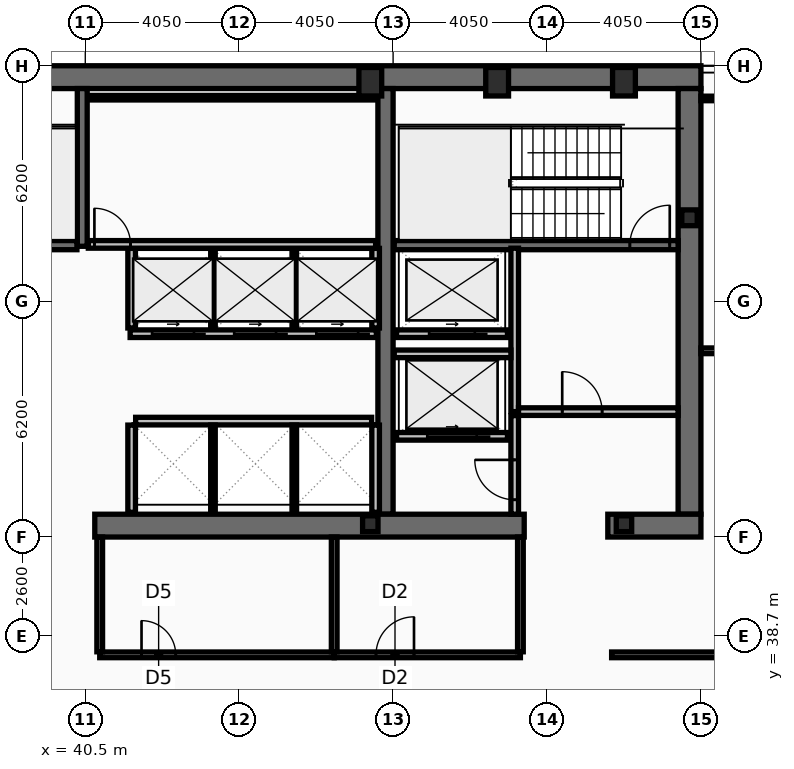
"""IFC4 building model, lengths in metres.
Left out: names, types, materials, properties, quantities, classifications, styles, units other than length and angle.
Written with IfcOpenShell. Run it as: python <this file> out.ifc"""

import sys

from ifc_helpers import new_model, si_unit, direction, frame, frame_2d, origin, origin_2d, place, context, subcontext, project, spatial, rectangle, hollow_rectangle, i_section, extrude, element, fill, save


model = new_model("IFC4")
c1 = context("Model", 3, precision=1e-05, world=origin(), true_north=direction((0.0, 1.0)))
c2 = subcontext(c1, "Body", "Model", "MODEL_VIEW")
j1 = project(units=[si_unit("LENGTHUNIT", "METRE"), si_unit("PLANEANGLEUNIT", "RADIAN")], contexts=[c1])
p1 = place(None, origin())
s1 = spatial("IfcSite", under=j1, at=p1, CompositionType="ELEMENT")
p2 = place(p1, origin())
s2 = spatial("IfcBuilding", under=s1, at=p2, CompositionType="ELEMENT")
p3 = place(p2, frame((0.0, 0.0, 217.4)))
s3 = spatial("IfcBuildingStorey", under=s2, at=p3, CompositionType="ELEMENT", Elevation=217.4)
p4 = place(p3, frame((16.2, 53.4, 0.0), z_axis=(0.0, 0.0, 1.0), x_axis=(1.0, 0.0, 0.0)))
e1 = element("IfcWall", 1, at=p4, inside=s3, PredefinedType="SHEAR", context=c2, shape_type="SweptSolid", body=[
    extrude(rectangle(XDim=40.5, YDim=0.6, at=frame_2d((20.25, 0.0))), origin(), (0.0, 0.0, 1.0), 3.44),
])
p5 = place(p3, frame((56.4, 53.1, 0.0), z_axis=(0.0, 0.0, 1.0), x_axis=(0.0, -1.0, 0.0)))
e2 = element("IfcWall", 2, at=p5, inside=s3, PredefinedType="SHEAR", context=c2, shape_type="SweptSolid", body=[
    extrude(rectangle(XDim=11.2, YDim=0.6, at=frame_2d((5.6, 0.0))), origin(), (0.0, 0.0, 1.0), 3.44),
])
p6 = place(p3, frame((48.4, 41.9, 0.0), z_axis=(0.0, 0.0, 1.0), x_axis=(0.0, 1.0, 0.0)))
e3 = element("IfcWall", 3, at=p6, inside=s3, PredefinedType="SHEAR", context=c2, shape_type="SweptSolid", body=[
    extrude(rectangle(XDim=11.2, YDim=0.4, at=frame_2d((5.6, 0.0))), origin(), (0.0, 0.0, 1.0), 3.44),
])
p7 = place(p3, frame((52.05, 41.6, 0.0), z_axis=(0.0, 0.0, 1.0), x_axis=(-1.0, 0.0, 0.0)))
e4 = element("IfcWall", 4, at=p7, inside=s3, PredefinedType="SHEAR", context=c2, shape_type="SweptSolid", body=[
    extrude(rectangle(XDim=11.3, YDim=0.6, at=frame_2d((5.65, 0.0))), origin(), (0.0, 0.0, 1.0), 3.44),
])
p8 = place(p3, frame((56.7, 41.6, 0.0), z_axis=(0.0, 0.0, 1.0), x_axis=(-1.0, 0.0, 0.0)))
e5 = element("IfcWall", 5, at=p8, inside=s3, PredefinedType="SHEAR", context=c2, shape_type="SweptSolid", body=[
    extrude(rectangle(XDim=2.45, YDim=0.6, at=frame_2d((1.225, 0.0))), origin(), (0.0, 0.0, 1.0), 3.44),
])
p9 = place(p3, frame((40.42, 48.95, 0.0), z_axis=(0.0, 0.0, 1.0), x_axis=(0.0, 1.0, 0.0)))
e6 = element("IfcWall", 6, at=p9, inside=s3, PredefinedType="SHEAR", context=c2, shape_type="SweptSolid", body=[
    extrude(rectangle(XDim=4.15, YDim=0.26, at=frame_2d((2.075, 0.0))), origin(), (0.0, 0.0, 1.0), 3.44),
])
p10 = place(p3, frame((48.63, 48.98, 0.0), z_axis=(0.0, 0.0, 1.0), x_axis=(1.0, 0.0, 0.0)))
e7 = element("IfcWall", 7, at=p10, inside=s3, PredefinedType="SHEAR", context=c2, shape_type="SweptSolid", body=[
    extrude(rectangle(XDim=7.47, YDim=0.24, at=frame_2d((3.735, 0.0))), origin(), (0.0, 0.0, 1.0), 3.44),
])
p11 = place(p10, frame((6.2, 0.0, 0.0)))
e8 = element("IfcOpeningElement", 8, at=p11, cuts=e7, PredefinedType="OPENING", context=c2, shape_type="SweptSolid", body=[
    extrude(rectangle(XDim=1.05, YDim=2.15, at=frame_2d((0.525, 1.075))), frame((0.0, 0.13, 0.0), z_axis=(0.0, -1.0, 0.0), x_axis=(1.0, 0.0, 0.0)), (0.0, 0.0, 1.0), 0.26),
])
p12 = place(p3, frame((32.72, 48.98, 0.0), z_axis=(0.0, 0.0, 1.0), x_axis=(1.0, 0.0, 0.0)))
e9 = element("IfcWall", 9, at=p12, inside=s3, PredefinedType="SHEAR", context=c2, shape_type="SweptSolid", body=[
    extrude(rectangle(XDim=7.56, YDim=0.24, at=frame_2d((3.78, 0.0))), origin(), (0.0, 0.0, 1.0), 3.44),
])
p13 = place(p12, frame((0.22, 0.0, 0.0)))
e10 = element("IfcOpeningElement", 10, at=p13, cuts=e9, PredefinedType="OPENING", context=c2, shape_type="SweptSolid", body=[
    extrude(rectangle(XDim=1.05, YDim=2.15, at=frame_2d((0.525, 1.075))), frame((0.0, 0.13, 0.0), z_axis=(0.0, -1.0, 0.0), x_axis=(1.0, 0.0, 0.0)), (0.0, 0.0, 1.0), 0.26),
])
for number, where, z_axis, x_axis in (
    (11, (48.0, 53.28, 0.0), (0.0, 0.0, 1.0), (1.0, 0.0, 0.0)),
    (12, (51.337, 53.28, 0.0), (0.0, 0.0, 1.0), (1.0, 0.0, 0.0)),
    (13, (54.675, 53.28, 0.0), (0.0, 0.0, 1.0), (1.0, 0.0, 0.0)),
):
    element("IfcColumn", number, at=place(p3, frame(where, z_axis=z_axis, x_axis=x_axis)), inside=s3, PredefinedType="COLUMN", context=c2, shape_type="SweptSolid", body=[
        extrude(hollow_rectangle(XDim=0.6, YDim=0.75, WallThickness=0.045, at=origin_2d()), origin(), (0.0, 0.0, 1.0), 3.6),
    ])
for number, where, z_axis, x_axis in (
    (14, (56.4, 49.7, 0.0), (0.0, 0.0, 1.0), (1.0, 0.0, 0.0)),
    (15, (48.0, 41.65, 0.0), (0.0, 0.0, 1.0), (1.0, 0.0, 0.0)),
    (16, (54.675, 41.65, 0.0), (0.0, 0.0, 1.0), (1.0, 0.0, 0.0)),
):
    element("IfcColumn", number, at=place(p3, frame(where, z_axis=z_axis, x_axis=x_axis)), inside=s3, PredefinedType="COLUMN", context=c2, shape_type="SweptSolid", body=[
        extrude(i_section(OverallWidth=0.406, OverallDepth=0.416, WebThickness=0.03, FlangeThickness=0.048, at=origin_2d()), origin(), (0.0, 0.0, 1.0), 3.6),
    ])
p14 = place(p3, frame((51.61, 43.95, 0.0), z_axis=(0.0, 0.0, 1.0), x_axis=(-1.0, 0.0, 0.0)))
e17 = element("IfcWall", 17, at=p14, inside=s3, PredefinedType="PARTITIONING", context=c2, shape_type="SweptSolid", body=[
    extrude(rectangle(XDim=2.92, YDim=0.2, at=frame_2d((1.46, 0.0))), origin(), (0.0, 0.0, 1.0), 3.44),
])
p15 = place(p14, frame((0.81, 0.0, 0.0)))
e18 = element("IfcOpeningElement", 18, at=p15, cuts=e17, PredefinedType="OPENING", context=c2, shape_type="SweptSolid", body=[
    extrude(rectangle(XDim=1.3, YDim=2.18, at=frame_2d((0.65, 1.09))), frame((0.0, 0.11, 0.0), z_axis=(0.0, -1.0, 0.0), x_axis=(1.0, 0.0, 0.0)), (0.0, 0.0, 1.0), 0.22),
])
p16 = place(p3, frame((51.61, 46.65, 0.0), z_axis=(0.0, 0.0, 1.0), x_axis=(-1.0, 0.0, 0.0)))
e19 = element("IfcWall", 19, at=p16, inside=s3, PredefinedType="PARTITIONING", context=c2, shape_type="SweptSolid", body=[
    extrude(rectangle(XDim=2.92, YDim=0.2, at=frame_2d((1.46, 0.0))), origin(), (0.0, 0.0, 1.0), 3.44),
])
p17 = place(p16, frame((0.86, 0.0, 0.0)))
e20 = element("IfcOpeningElement", 20, at=p17, cuts=e19, PredefinedType="OPENING", context=c2, shape_type="SweptSolid", body=[
    extrude(rectangle(XDim=1.2, YDim=2.18, at=frame_2d((0.6, 1.09))), frame((0.0, 0.11, 0.0), z_axis=(0.0, -1.0, 0.0), x_axis=(1.0, 0.0, 0.0)), (0.0, 0.0, 1.0), 0.22),
])
p18 = place(p3, frame((48.16, 46.65, 0.0), z_axis=(0.0, 0.0, 1.0), x_axis=(-1.0, 0.0, 0.0)))
e21 = element("IfcWall", 21, at=p18, inside=s3, PredefinedType="PARTITIONING", context=c2, shape_type="SweptSolid", body=[
    extrude(rectangle(XDim=6.48, YDim=0.2, at=frame_2d((3.24, 0.0))), origin(), (0.0, 0.0, 1.0), 3.44),
])
p19 = place(p18, frame((4.8, 0.0, 0.0)))
e22 = element("IfcOpeningElement", 22, at=p19, cuts=e21, PredefinedType="OPENING", context=c2, shape_type="SweptSolid", body=[
    extrude(rectangle(XDim=1.1, YDim=2.18, at=frame_2d((0.55, 1.09))), frame((0.0, 0.11, 0.0), z_axis=(0.0, -1.0, 0.0), x_axis=(1.0, 0.0, 0.0)), (0.0, 0.0, 1.0), 0.22),
])
p20 = place(p18, frame((2.64, 0.0, 0.0)))
e23 = element("IfcOpeningElement", 23, at=p20, cuts=e21, PredefinedType="OPENING", context=c2, shape_type="SweptSolid", body=[
    extrude(rectangle(XDim=1.1, YDim=2.18, at=frame_2d((0.55, 1.09))), frame((0.0, 0.11, 0.0), z_axis=(0.0, -1.0, 0.0), x_axis=(1.0, 0.0, 0.0)), (0.0, 0.0, 1.0), 0.22),
])
p21 = place(p18, frame((0.48, 0.0, 0.0)))
e24 = element("IfcOpeningElement", 24, at=p21, cuts=e21, PredefinedType="OPENING", context=c2, shape_type="SweptSolid", body=[
    extrude(rectangle(XDim=1.1, YDim=2.18, at=frame_2d((0.55, 1.09))), frame((0.0, 0.11, 0.0), z_axis=(0.0, -1.0, 0.0), x_axis=(1.0, 0.0, 0.0)), (0.0, 0.0, 1.0), 0.22),
])
p22 = place(p3, frame((51.8, 44.6, 0.0), z_axis=(0.0, 0.0, 1.0), x_axis=(0.0, 1.0, 0.0)))
e25 = element("IfcWall", 25, at=p22, inside=s3, PredefinedType="PARTITIONING", context=c2, shape_type="SweptSolid", body=[
    extrude(rectangle(XDim=4.3, YDim=0.2, at=frame_2d((2.15, 0.0))), origin(), (0.0, 0.0, 1.0), 3.44),
])
p23 = place(p3, frame((51.9, 44.6, 0.0), z_axis=(0.0, 0.0, 1.0), x_axis=(1.0, 0.0, 0.0)))
e26 = element("IfcWall", 26, at=p23, inside=s3, PredefinedType="PARTITIONING", context=c2, shape_type="SweptSolid", body=[
    extrude(rectangle(XDim=4.2, YDim=0.2, at=frame_2d((2.1, 0.0))), origin(), (0.0, 0.0, 1.0), 3.44),
])
p24 = place(p23, frame((1.15, 0.0, 0.0)))
e27 = element("IfcOpeningElement", 27, at=p24, cuts=e26, PredefinedType="OPENING", context=c2, shape_type="SweptSolid", body=[
    extrude(rectangle(XDim=1.05, YDim=2.15, at=frame_2d((0.525, 1.075))), frame((0.0, 0.11, 0.0), z_axis=(0.0, -1.0, 0.0), x_axis=(1.0, 0.0, 0.0)), (0.0, 0.0, 1.0), 0.22),
])
p25 = place(p3, frame((48.63, 46.12, 0.0), z_axis=(0.0, 0.0, 1.0), x_axis=(1.0, 0.0, 0.0)))
e28 = element("IfcWall", 28, at=p25, inside=s3, PredefinedType="PARTITIONING", context=c2, shape_type="SweptSolid", body=[
    extrude(rectangle(XDim=3.07, YDim=0.2, at=frame_2d((1.535, 0.0))), origin(), (0.0, 0.0, 1.0), 3.44),
])
p26 = place(p3, frame((51.8, 41.9, 0.0), z_axis=(0.0, 0.0, 1.0), x_axis=(0.0, 1.0, 0.0)))
e29 = element("IfcWall", 29, at=p26, inside=s3, PredefinedType="PARTITIONING", context=c2, shape_type="SweptSolid", body=[
    extrude(rectangle(XDim=2.595, YDim=0.2, at=frame_2d((1.298, 0.0))), origin(), (0.0, 0.0, 1.0), 3.44),
])
p27 = place(p26, frame((0.38, 0.0, 0.0)))
e30 = element("IfcOpeningElement", 30, at=p27, cuts=e29, PredefinedType="OPENING", context=c2, shape_type="SweptSolid", body=[
    extrude(rectangle(XDim=1.05, YDim=2.15, at=frame_2d((0.525, 1.075))), frame((0.0, 0.11, 0.0), z_axis=(0.0, -1.0, 0.0), x_axis=(1.0, 0.0, 0.0)), (0.0, 0.0, 1.0), 0.22),
])
for number, where, z_axis, x_axis in (
    (31, (41.72, 46.8, 0.0), (0.0, 0.0, 1.0), (0.0, 1.0, 0.0)),
    (32, (48.14, 46.8, 0.0), (0.0, 0.0, 1.0), (0.0, 1.0, 0.0)),
):
    element("IfcWall", number, at=place(p3, frame(where, z_axis=z_axis, x_axis=x_axis)), inside=s3, PredefinedType="PARTITIONING", context=c2, shape_type="SweptSolid", body=[
        extrude(rectangle(XDim=2.095, YDim=0.2, at=frame_2d((1.047, 0.0))), origin(), (0.0, 0.0, 1.0), 3.44),
    ])
for number, where, z_axis, x_axis in (
    (33, (43.86, 46.8, 0.0), (0.0, 0.0, 1.0), (0.0, 1.0, 0.0)),
    (34, (46.0, 46.8, 0.0), (0.0, 0.0, 1.0), (0.0, 1.0, 0.0)),
):
    element("IfcWall", number, at=place(p3, frame(where, z_axis=z_axis, x_axis=x_axis)), inside=s3, PredefinedType="PARTITIONING", context=c2, shape_type="SweptSolid", body=[
        extrude(rectangle(XDim=2.095, YDim=0.12, at=frame_2d((1.047, 0.0))), origin(), (0.0, 0.0, 1.0), 3.44),
    ])
p28 = place(p3, frame((41.825, 44.35, 0.0), z_axis=(0.0, 0.0, 1.0), x_axis=(1.0, 0.0, 0.0)))
e35 = element("IfcWall", 35, at=p28, inside=s3, PredefinedType="PARTITIONING", context=c2, shape_type="SweptSolid", body=[
    extrude(rectangle(XDim=6.21, YDim=0.2, at=frame_2d((3.105, 0.0))), origin(), (0.0, 0.0, 1.0), 3.44),
])
for number, where, z_axis, x_axis in (
    (36, (41.72, 41.95, 0.0), (0.0, 0.0, 1.0), (0.0, 1.0, 0.0)),
    (37, (48.14, 41.95, 0.0), (0.0, 0.0, 1.0), (0.0, 1.0, 0.0)),
):
    element("IfcWall", number, at=place(p3, frame(where, z_axis=z_axis, x_axis=x_axis)), inside=s3, PredefinedType="PARTITIONING", context=c2, shape_type="SweptSolid", body=[
        extrude(rectangle(XDim=2.295, YDim=0.2, at=frame_2d((1.147, 0.0))), origin(), (0.0, 0.0, 1.0), 3.44),
    ])
for number, where, z_axis, x_axis in (
    (38, (43.86, 41.95, 0.0), (0.0, 0.0, 1.0), (0.0, 1.0, 0.0)),
    (39, (46.0, 41.95, 0.0), (0.0, 0.0, 1.0), (0.0, 1.0, 0.0)),
):
    element("IfcWall", number, at=place(p3, frame(where, z_axis=z_axis, x_axis=x_axis)), inside=s3, PredefinedType="PARTITIONING", context=c2, shape_type="SweptSolid", body=[
        extrude(rectangle(XDim=2.295, YDim=0.12, at=frame_2d((1.147, 0.0))), origin(), (0.0, 0.0, 1.0), 3.44),
    ])
p29 = place(p3, frame((40.58, 52.86, 0.0), z_axis=(0.0, 0.0, 1.0), x_axis=(1.0, 0.0, 0.0)))
e40 = element("IfcWall", 40, at=p29, inside=s3, PredefinedType="PARTITIONING", context=c2, shape_type="SweptSolid", body=[
    extrude(rectangle(XDim=7.56, YDim=0.12, at=frame_2d((3.78, 0.0))), origin(), (0.0, 0.0, 1.0), 3.44),
])
p30 = place(p3, frame((40.58, 49.0, 0.0), z_axis=(0.0, 0.0, 1.0), x_axis=(1.0, 0.0, 0.0)))
e41 = element("IfcWall", 41, at=p30, inside=s3, PredefinedType="PARTITIONING", context=c2, shape_type="SweptSolid", body=[
    extrude(rectangle(XDim=7.56, YDim=0.2, at=frame_2d((3.78, 0.0))), origin(), (0.0, 0.0, 1.0), 3.44),
])
p31 = place(p30, frame((0.16, 0.0, 0.0)))
e42 = element("IfcOpeningElement", 42, at=p31, cuts=e41, PredefinedType="OPENING", context=c2, shape_type="SweptSolid", body=[
    extrude(rectangle(XDim=0.95, YDim=2.1, at=frame_2d((0.475, 1.05))), frame((0.0, 0.11, 0.0), z_axis=(0.0, -1.0, 0.0), x_axis=(1.0, 0.0, 0.0)), (0.0, 0.0, 1.0), 0.22),
])
p32 = place(p3, frame((40.88, 38.2, 0.0), z_axis=(0.0, 0.0, 1.0), x_axis=(1.0, 0.0, 0.0)))
e43 = element("IfcWall", 43, at=p32, inside=s3, PredefinedType="PARTITIONING", context=c2, shape_type="SweptSolid", body=[
    extrude(rectangle(XDim=6.17, YDim=0.15, at=frame_2d((3.085, 0.0))), origin(), (0.0, 0.0, 1.0), 2.78),
])
p33 = place(p32, frame((1.1, 0.0, 0.0)))
e44 = element("IfcOpeningElement", 44, at=p33, cuts=e43, PredefinedType="OPENING", context=c2, shape_type="SweptSolid", body=[
    extrude(rectangle(XDim=0.9, YDim=2.05, at=frame_2d((0.45, 1.025))), frame((0.0, 0.085, 0.0), z_axis=(0.0, -1.0, 0.0), x_axis=(1.0, 0.0, 0.0)), (0.0, 0.0, 1.0), 0.17),
])
p34 = place(p3, frame((47.05, 38.2, 0.0), z_axis=(0.0, 0.0, 1.0), x_axis=(1.0, 0.0, 0.0)))
e45 = element("IfcWall", 45, at=p34, inside=s3, PredefinedType="PARTITIONING", context=c2, shape_type="SweptSolid", body=[
    extrude(rectangle(XDim=4.9, YDim=0.15, at=frame_2d((2.45, 0.0))), origin(), (0.0, 0.0, 1.0), 2.78),
])
p35 = place(p34, frame((1.1, 0.0, 0.0)))
e46 = element("IfcOpeningElement", 46, at=p35, cuts=e45, PredefinedType="OPENING", context=c2, shape_type="SweptSolid", body=[
    extrude(rectangle(XDim=1.0, YDim=2.05, at=frame_2d((0.5, 1.025))), frame((0.0, 0.085, 0.0), z_axis=(0.0, -1.0, 0.0), x_axis=(1.0, 0.0, 0.0)), (0.0, 0.0, 1.0), 0.17),
])
for number, where, z_axis, x_axis in (
    (47, (40.88, 38.28, 0.0), (0.0, 0.0, 1.0), (0.0, 1.0, 0.0)),
    (48, (47.05, 38.28, 0.0), (0.0, 0.0, 1.0), (0.0, 1.0, 0.0)),
    (49, (51.95, 38.28, 0.0), (0.0, 0.0, 1.0), (0.0, 1.0, 0.0)),
):
    element("IfcWall", number, at=place(p3, frame(where, z_axis=z_axis, x_axis=x_axis)), inside=s3, PredefinedType="PARTITIONING", context=c2, shape_type="SweptSolid", body=[
        extrude(rectangle(XDim=3.02, YDim=0.15, at=frame_2d((1.51, 0.0))), origin(), (0.0, 0.0, 1.0), 3.44),
    ])
p36 = place(p3, frame((54.35, 38.2, 0.0), z_axis=(0.0, 0.0, 1.0), x_axis=(1.0, 0.0, 0.0)))
e50 = element("IfcWall", 50, at=p36, inside=s3, PredefinedType="PARTITIONING", context=c2, shape_type="SweptSolid", body=[
    extrude(rectangle(XDim=10.52, YDim=0.15, at=frame_2d((5.26, 0.0))), origin(), (0.0, 0.0, 1.0), 2.78),
])
p37 = place(p36, frame((3.25, 0.0, 0.0)))
e51 = element("IfcOpeningElement", 51, at=p37, cuts=e50, PredefinedType="OPENING", context=c2, shape_type="SweptSolid", body=[
    extrude(rectangle(XDim=0.95, YDim=2.05, at=frame_2d((0.475, 1.025))), frame((0.0, 0.085, 0.0), z_axis=(0.0, -1.0, 0.0), x_axis=(1.0, 0.0, 0.0)), (0.0, 0.0, 1.0), 0.17),
])
p38 = place(p3, frame((56.7, 46.2, 0.0), z_axis=(0.0, 0.0, 1.0), x_axis=(1.0, 0.0, 0.0)))
e52 = element("IfcWall", 52, at=p38, inside=s3, PredefinedType="PARTITIONING", context=c2, shape_type="SweptSolid", body=[
    extrude(rectangle(XDim=8.105, YDim=0.15, at=frame_2d((4.052, 0.0))), origin(), (0.0, 0.0, 1.0), 2.83),
])
p39 = place(p38, frame((0.9, 0.0, 0.0)))
e53 = element("IfcOpeningElement", 53, at=p39, cuts=e52, PredefinedType="OPENING", context=c2, shape_type="SweptSolid", body=[
    extrude(rectangle(XDim=0.9, YDim=2.05, at=frame_2d((0.45, 1.025))), frame((0.0, 0.085, 0.0), z_axis=(0.0, -1.0, 0.0), x_axis=(1.0, 0.0, 0.0)), (0.0, 0.0, 1.0), 0.17),
])
p40 = place(p3, frame((56.7, 52.84, 0.0), z_axis=(0.0, 0.0, 1.0), x_axis=(1.0, 0.0, 0.0)))
e54 = element("IfcWall", 54, at=p40, inside=s3, PredefinedType="PARTITIONING", context=c2, shape_type="SweptSolid", body=[
    extrude(rectangle(XDim=8.105, YDim=0.12, at=frame_2d((4.052, 0.0))), origin(), (0.0, 0.0, 1.0), 3.44),
])
p41 = place(p11, origin())
e55 = element("IfcDoor", 55, at=p41, inside=s3, OperationType="SINGLE_SWING_RIGHT", PredefinedType="DOOR", context=c2, shape_type="SweptSolid", body=[
    extrude(rectangle(XDim=1.05, YDim=2.15, at=frame_2d((0.525, 1.075))), frame((0.0, 0.025, 0.0), z_axis=(0.0, -1.0, 0.0), x_axis=(1.0, 0.0, 0.0)), (0.0, 0.0, 1.0), 0.05),
])
fill(e8, e55)
p42 = place(p15, origin())
e56 = element("IfcDoor", 56, at=p42, inside=s3, OperationType="SLIDING_TO_LEFT", PredefinedType="DOOR", context=c2, shape_type="SweptSolid", body=[
    extrude(rectangle(XDim=1.3, YDim=2.18, at=frame_2d((0.65, 1.09))), frame((0.0, 0.025, 0.0), z_axis=(0.0, -1.0, 0.0), x_axis=(1.0, 0.0, 0.0)), (0.0, 0.0, 1.0), 0.05),
])
fill(e18, e56)
p43 = place(p17, origin())
e57 = element("IfcDoor", 57, at=p43, inside=s3, OperationType="SLIDING_TO_LEFT", PredefinedType="DOOR", context=c2, shape_type="SweptSolid", body=[
    extrude(rectangle(XDim=1.2, YDim=2.18, at=frame_2d((0.6, 1.09))), frame((0.0, 0.025, 0.0), z_axis=(0.0, -1.0, 0.0), x_axis=(1.0, 0.0, 0.0)), (0.0, 0.0, 1.0), 0.05),
])
fill(e20, e57)
p44 = place(p19, origin())
e58 = element("IfcDoor", 58, at=p44, inside=s3, OperationType="SLIDING_TO_LEFT", PredefinedType="DOOR", context=c2, shape_type="SweptSolid", body=[
    extrude(rectangle(XDim=1.1, YDim=2.18, at=frame_2d((0.55, 1.09))), frame((0.0, 0.025, 0.0), z_axis=(0.0, -1.0, 0.0), x_axis=(1.0, 0.0, 0.0)), (0.0, 0.0, 1.0), 0.05),
])
fill(e22, e58)
p45 = place(p20, origin())
e59 = element("IfcDoor", 59, at=p45, inside=s3, OperationType="SLIDING_TO_LEFT", PredefinedType="DOOR", context=c2, shape_type="SweptSolid", body=[
    extrude(rectangle(XDim=1.1, YDim=2.18, at=frame_2d((0.55, 1.09))), frame((0.0, 0.025, 0.0), z_axis=(0.0, -1.0, 0.0), x_axis=(1.0, 0.0, 0.0)), (0.0, 0.0, 1.0), 0.05),
])
fill(e23, e59)
p46 = place(p21, origin())
e60 = element("IfcDoor", 60, at=p46, inside=s3, OperationType="SLIDING_TO_LEFT", PredefinedType="DOOR", context=c2, shape_type="SweptSolid", body=[
    extrude(rectangle(XDim=1.1, YDim=2.18, at=frame_2d((0.55, 1.09))), frame((0.0, 0.025, 0.0), z_axis=(0.0, -1.0, 0.0), x_axis=(1.0, 0.0, 0.0)), (0.0, 0.0, 1.0), 0.05),
])
fill(e24, e60)
p47 = place(p24, origin())
e61 = element("IfcDoor", 61, at=p47, inside=s3, OperationType="SINGLE_SWING_LEFT", PredefinedType="DOOR", context=c2, shape_type="SweptSolid", body=[
    extrude(rectangle(XDim=1.05, YDim=2.15, at=frame_2d((0.525, 1.075))), frame((0.0, 0.025, 0.0), z_axis=(0.0, -1.0, 0.0), x_axis=(1.0, 0.0, 0.0)), (0.0, 0.0, 1.0), 0.05),
])
fill(e27, e61)
p48 = place(p27, origin())
e62 = element("IfcDoor", 62, at=p48, inside=s3, OperationType="SINGLE_SWING_RIGHT", PredefinedType="DOOR", context=c2, shape_type="SweptSolid", body=[
    extrude(rectangle(XDim=1.05, YDim=2.15, at=frame_2d((0.525, 1.075))), frame((0.0, 0.025, 0.0), z_axis=(0.0, -1.0, 0.0), x_axis=(1.0, 0.0, 0.0)), (0.0, 0.0, 1.0), 0.05),
])
fill(e30, e62)
p49 = place(p31, origin())
e63 = element("IfcDoor", 63, at=p49, inside=s3, OperationType="SINGLE_SWING_LEFT", PredefinedType="DOOR", context=c2, shape_type="SweptSolid", body=[
    extrude(rectangle(XDim=0.95, YDim=2.1, at=frame_2d((0.475, 1.05))), frame((0.0, 0.025, 0.0), z_axis=(0.0, -1.0, 0.0), x_axis=(1.0, 0.0, 0.0)), (0.0, 0.0, 1.0), 0.05),
])
fill(e42, e63)
p50 = place(p33, origin())
e64 = element("IfcDoor", 64, at=p50, inside=s3, OperationType="SINGLE_SWING_LEFT", PredefinedType="DOOR", context=c2, shape_type="SweptSolid", body=[
    extrude(rectangle(XDim=0.9, YDim=2.05, at=frame_2d((0.45, 1.025))), frame((0.0, 0.025, 0.0), z_axis=(0.0, -1.0, 0.0), x_axis=(1.0, 0.0, 0.0)), (0.0, 0.0, 1.0), 0.05),
])
fill(e44, e64)
p51 = place(p35, origin())
e65 = element("IfcDoor", 65, at=p51, inside=s3, OperationType="SINGLE_SWING_RIGHT", PredefinedType="DOOR", context=c2, shape_type="SweptSolid", body=[
    extrude(rectangle(XDim=1.0, YDim=2.05, at=frame_2d((0.5, 1.025))), frame((0.0, 0.025, 0.0), z_axis=(0.0, -1.0, 0.0), x_axis=(1.0, 0.0, 0.0)), (0.0, 0.0, 1.0), 0.05),
])
fill(e46, e65)
save(model, sys.argv[1])
